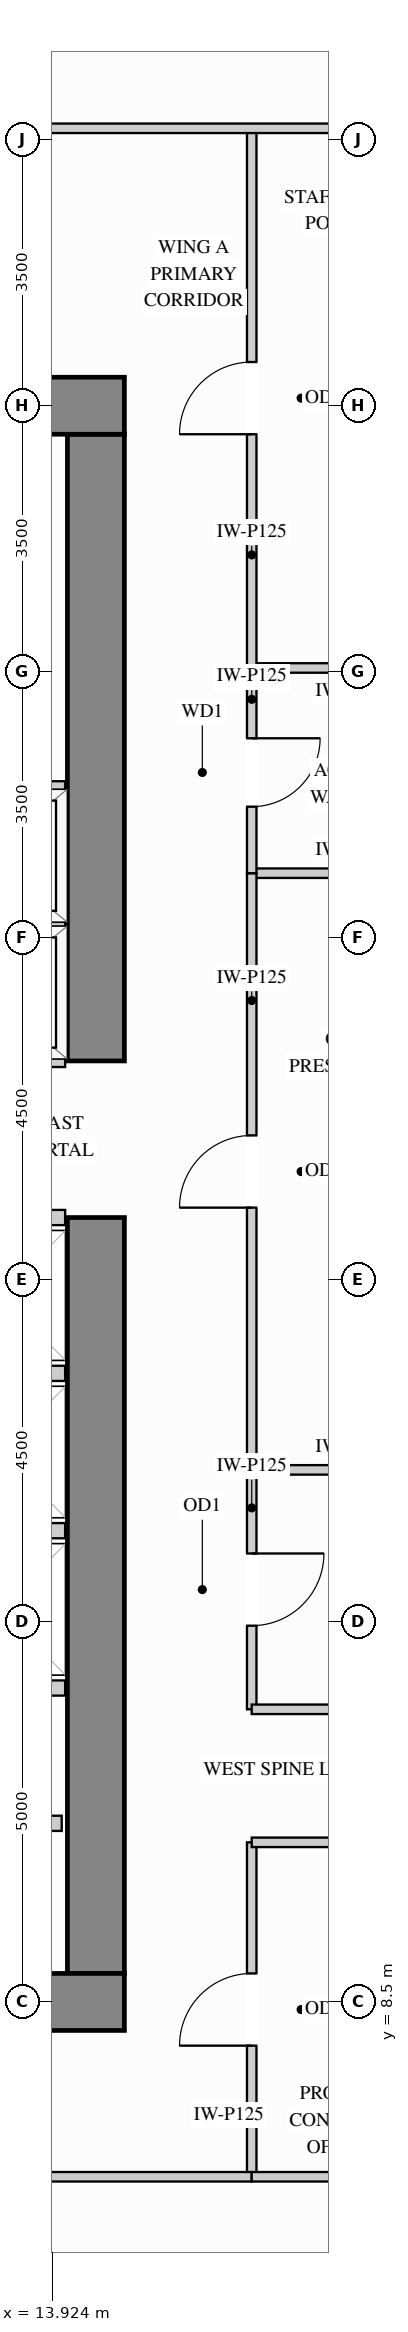
"""IFC4 building model, lengths in metres.
Left out: names, types, materials, properties, quantities, classifications, styles, units other than length and angle.
Written with IfcOpenShell. Run it as: python <this file> out.ifc"""

import sys

from ifc_helpers import new_model, si_unit, direction, frame, frame_2d, origin, place, context, subcontext, project, spatial, rectangle, extrude, source, transform, mapped, element, fill, save


model = new_model("IFC4")
c1 = context("Model", 3, precision=1e-05, world=origin(), true_north=direction((0.0, 1.0)))
c2 = subcontext(c1, "Body", "Model", "MODEL_VIEW")
j1 = project(units=[si_unit("LENGTHUNIT", "METRE"), si_unit("PLANEANGLEUNIT", "RADIAN")], contexts=[c1])
p1 = place(None, origin())
s1 = spatial("IfcSite", under=j1, at=p1, CompositionType="ELEMENT")
p2 = place(p1, origin())
s2 = spatial("IfcBuilding", under=s1, at=p2, CompositionType="ELEMENT")
p3 = place(p2, frame((0.0, 0.0, 84.6)))
s3 = spatial("IfcBuildingStorey", under=s2, at=p3, CompositionType="ELEMENT", Elevation=84.6)
m1 = source(origin(), c2, "Body", "SweptSolid", [
    extrude(rectangle(XDim=9.945, YDim=0.75, at=frame_2d((4.973, 0.0))), origin(), (0.0, 0.0, 1.0), 3.38),
])
p4 = place(p3, frame((14.5, 8.875, 0.0), z_axis=(0.0, 0.0, 1.0), x_axis=(0.0, 1.0, 0.0)))
e1 = element("IfcWall", 1, at=p4, inside=s3, PredefinedType="SHEAR", context=c2, shape_type="MappedRepresentation", body=[
    mapped(m1, transform((0.0, 0.0, 0.0), x_axis=(1.0, 0.0, 0.0), y_axis=(0.0, 1.0, 0.0), z_axis=(0.0, 0.0, 1.0))),
])
m2 = source(origin(), c2, "Body", "SweptSolid", [
    extrude(rectangle(XDim=8.245, YDim=0.75, at=frame_2d((4.123, 0.0))), origin(), (0.0, 0.0, 1.0), 3.38),
])
p5 = place(p3, frame((14.5, 20.88, 0.0), z_axis=(0.0, 0.0, 1.0), x_axis=(0.0, 1.0, 0.0)))
e2 = element("IfcWall", 2, at=p5, inside=s3, PredefinedType="SHEAR", context=c2, shape_type="MappedRepresentation", body=[
    mapped(m2, transform((0.0, 0.0, 0.0), x_axis=(1.0, 0.0, 0.0), y_axis=(0.0, 1.0, 0.0), z_axis=(0.0, 0.0, 1.0))),
])
m3 = source(origin(), c2, "Body", "SweptSolid", [
    extrude(rectangle(XDim=10.75, YDim=0.75, at=frame_2d((5.375, 0.0))), origin(), (0.0, 0.0, 1.0), 3.38),
])
for number, where, z_axis, x_axis in (
    (3, (4.125, 29.5, 0.0), (0.0, 0.0, 1.0), (1.0, 0.0, 0.0)),
    (4, (4.125, 8.5, 0.0), (0.0, 0.0, 1.0), (1.0, 0.0, 0.0)),
):
    element("IfcWall", number, at=place(p3, frame(where, z_axis=z_axis, x_axis=x_axis)), inside=s3, PredefinedType="SHEAR", context=c2, shape_type="MappedRepresentation", body=[
        mapped(m3, transform((0.0, 0.0, 0.0), x_axis=(1.0, 0.0, 0.0), y_axis=(0.0, 1.0, 0.0), z_axis=(0.0, 0.0, 1.0))),
    ])
m4 = source(origin(), c2, "Body", "SweptSolid", [
    extrude(rectangle(XDim=2.6, YDim=0.125, at=frame_2d((1.3, 0.0))), origin(), (0.0, 0.0, 1.0), 3.365),
])
p6 = place(p3, frame((16.55, 15.5, 0.0), z_axis=(0.0, 0.0, 1.0), x_axis=(1.0, 0.0, 0.0)))
e5 = element("IfcWall", 5, at=p6, inside=s3, PredefinedType="PARTITIONING", context=c2, shape_type="MappedRepresentation", body=[
    mapped(m4, transform((0.0, 0.0, 0.0), x_axis=(1.0, 0.0, 0.0), y_axis=(0.0, 1.0, 0.0), z_axis=(0.0, 0.0, 1.0))),
])
m5 = source(origin(), c2, "Body", "SweptSolid", [
    extrude(rectangle(XDim=2.598, YDim=0.125, at=frame_2d((1.299, 0.0))), origin(), (0.0, 0.0, 1.0), 3.365),
])
for number, where, z_axis, x_axis in (
    (6, (16.55, 23.35, 0.0), (0.0, 0.0, 1.0), (1.0, 0.0, 0.0)),
    (7, (16.55, 26.05, 0.0), (0.0, 0.0, 1.0), (1.0, 0.0, 0.0)),
):
    element("IfcWall", number, at=place(p3, frame(where, z_axis=z_axis, x_axis=x_axis)), inside=s3, PredefinedType="PARTITIONING", context=c2, shape_type="MappedRepresentation", body=[
        mapped(m5, transform((0.0, 0.0, 0.0), x_axis=(1.0, 0.0, 0.0), y_axis=(0.0, 1.0, 0.0), z_axis=(0.0, 0.0, 1.0))),
    ])
p7 = place(p3, frame((16.55, 12.35, 0.0), z_axis=(0.0, 0.0, 1.0), x_axis=(0.0, 1.0, 0.0)))
e8 = element("IfcWall", 8, at=p7, inside=s3, PredefinedType="PARTITIONING", context=c2, shape_type="SweptSolid", body=[
    extrude(rectangle(XDim=3.15, YDim=0.125, at=frame_2d((1.575, 0.0))), origin(), (0.0, 0.0, 1.0), 3.365),
])
p8 = place(p7, frame((1.1, 0.0, 0.0)))
e9 = element("IfcOpeningElement", 9, at=p8, cuts=e8, PredefinedType="OPENING", context=c2, shape_type="SweptSolid", body=[
    extrude(rectangle(XDim=0.95, YDim=2.15, at=frame_2d((0.475, 1.075))), frame((0.0, 0.073, 0.0), z_axis=(0.0, -1.0, 0.0), x_axis=(1.0, 0.0, 0.0)), (0.0, 0.0, 1.0), 0.145),
])
p9 = place(p3, frame((16.55, 15.5, 0.0), z_axis=(0.0, 0.0, 1.0), x_axis=(0.0, 1.0, 0.0)))
e10 = element("IfcWall", 10, at=p9, inside=s3, PredefinedType="PARTITIONING", context=c2, shape_type="SweptSolid", body=[
    extrude(rectangle(XDim=7.85, YDim=0.125, at=frame_2d((3.925, 0.0))), origin(), (0.0, 0.0, 1.0), 3.365),
])
p10 = place(p9, frame((3.45, 0.0, 0.0)))
e11 = element("IfcOpeningElement", 11, at=p10, cuts=e10, PredefinedType="OPENING", context=c2, shape_type="SweptSolid", body=[
    extrude(rectangle(XDim=0.95, YDim=2.15, at=frame_2d((0.475, 1.075))), frame((0.0, 0.073, 0.0), z_axis=(0.0, -1.0, 0.0), x_axis=(1.0, 0.0, 0.0)), (0.0, 0.0, 1.0), 0.145),
])
p11 = place(p3, frame((16.55, 26.05, 0.0), z_axis=(0.0, 0.0, 1.0), x_axis=(0.0, 1.0, 0.0)))
e12 = element("IfcWall", 12, at=p11, inside=s3, PredefinedType="PARTITIONING", context=c2, shape_type="SweptSolid", body=[
    extrude(rectangle(XDim=7.1, YDim=0.125, at=frame_2d((3.55, 0.0))), origin(), (0.0, 0.0, 1.0), 3.365),
])
p12 = place(p11, frame((3.075, 0.0, 0.0)))
e13 = element("IfcOpeningElement", 13, at=p12, cuts=e12, PredefinedType="OPENING", context=c2, shape_type="SweptSolid", body=[
    extrude(rectangle(XDim=0.95, YDim=2.15, at=frame_2d((0.475, 1.075))), frame((0.0, 0.073, 0.0), z_axis=(0.0, -1.0, 0.0), x_axis=(1.0, 0.0, 0.0)), (0.0, 0.0, 1.0), 0.145),
])
p13 = place(p3, frame((16.55, 6.2, 0.0), z_axis=(0.0, 0.0, 1.0), x_axis=(0.0, 1.0, 0.0)))
e14 = element("IfcWall", 14, at=p13, inside=s3, PredefinedType="PARTITIONING", context=c2, shape_type="SweptSolid", body=[
    extrude(rectangle(XDim=4.4, YDim=0.125, at=frame_2d((2.2, 0.0))), origin(), (0.0, 0.0, 1.0), 3.365),
])
p14 = place(p13, frame((1.725, 0.0, 0.0)))
e15 = element("IfcOpeningElement", 15, at=p14, cuts=e14, PredefinedType="OPENING", context=c2, shape_type="SweptSolid", body=[
    extrude(rectangle(XDim=0.95, YDim=2.15, at=frame_2d((0.475, 1.075))), frame((0.0, 0.073, 0.0), z_axis=(0.0, -1.0, 0.0), x_axis=(1.0, 0.0, 0.0)), (0.0, 0.0, 1.0), 0.145),
])
p15 = place(p3, frame((16.55, 23.35, 0.0), z_axis=(0.0, 0.0, 1.0), x_axis=(0.0, 1.0, 0.0)))
e16 = element("IfcWall", 16, at=p15, inside=s3, PredefinedType="PARTITIONING", context=c2, shape_type="SweptSolid", body=[
    extrude(rectangle(XDim=2.7, YDim=0.125, at=frame_2d((1.35, 0.0))), origin(), (0.0, 0.0, 1.0), 3.365),
])
p16 = place(p15, frame((0.875, 0.0, 0.0)))
e17 = element("IfcOpeningElement", 17, at=p16, cuts=e16, PredefinedType="OPENING", context=c2, shape_type="SweptSolid", body=[
    extrude(rectangle(XDim=0.9, YDim=2.15, at=frame_2d((0.45, 1.075))), frame((0.0, 0.073, 0.0), z_axis=(0.0, -1.0, 0.0), x_axis=(1.0, 0.0, 0.0)), (0.0, 0.0, 1.0), 0.145),
])
m6 = source(origin(), c2, "Body", "SweptSolid", [
    extrude(rectangle(XDim=12.598, YDim=0.125, at=frame_2d((6.299, 0.0))), origin(), (0.0, 0.0, 1.0), 3.365),
])
p17 = place(p3, frame((6.55, 33.15, 0.0), z_axis=(0.0, 0.0, 1.0), x_axis=(1.0, 0.0, 0.0)))
e18 = element("IfcWall", 18, at=p17, inside=s3, PredefinedType="PARTITIONING", context=c2, shape_type="MappedRepresentation", body=[
    mapped(m6, transform((0.0, 0.0, 0.0), x_axis=(1.0, 0.0, 0.0), y_axis=(0.0, 1.0, 0.0), z_axis=(0.0, 0.0, 1.0))),
])
m7 = source(origin(), c2, "Body", "SweptSolid", [
    extrude(rectangle(XDim=2.95, YDim=0.125, at=frame_2d((1.475, 0.0))), origin(), (0.0, 0.0, 1.0), 3.365),
])
for number, where, z_axis, x_axis in (
    (19, (16.55, 12.35, 0.0), (0.0, 0.0, 1.0), (1.0, 0.0, 0.0)),
    (20, (16.55, 10.6, 0.0), (0.0, 0.0, 1.0), (1.0, 0.0, 0.0)),
):
    element("IfcWall", number, at=place(p3, frame(where, z_axis=z_axis, x_axis=x_axis)), inside=s3, PredefinedType="PARTITIONING", context=c2, shape_type="MappedRepresentation", body=[
        mapped(m7, transform((0.0, 0.0, 0.0), x_axis=(1.0, 0.0, 0.0), y_axis=(0.0, 1.0, 0.0), z_axis=(0.0, 0.0, 1.0))),
    ])
p18 = place(p3, frame((2.45, 6.2, 0.0), z_axis=(0.0, 0.0, 1.0), x_axis=(1.0, 0.0, 0.0)))
e21 = element("IfcWall", 21, at=p18, inside=s3, PredefinedType="PARTITIONING", context=c2, shape_type="SweptSolid", body=[
    extrude(rectangle(XDim=14.1, YDim=0.125, at=frame_2d((7.05, 0.0))), origin(), (0.0, 0.0, 1.0), 2.828),
])
p19 = place(p18, frame((6.575, 0.0, 0.0)))
e22 = element("IfcOpeningElement", 22, at=p19, cuts=e21, PredefinedType="OPENING", context=c2, shape_type="SweptSolid", body=[
    extrude(rectangle(XDim=0.95, YDim=2.15, at=frame_2d((0.475, 1.075))), frame((0.0, 0.073, 0.0), z_axis=(0.0, -1.0, 0.0), x_axis=(1.0, 0.0, 0.0)), (0.0, 0.0, 1.0), 0.145),
])
m8 = source(origin(), c2, "Body", "SweptSolid", [
    extrude(rectangle(XDim=2.6, YDim=0.125, at=frame_2d((1.3, 0.0))), origin(), (0.0, 0.0, 1.0), 2.828),
])
p20 = place(p3, frame((16.55, 6.2, 0.0), z_axis=(0.0, 0.0, 1.0), x_axis=(1.0, 0.0, 0.0)))
e23 = element("IfcWall", 23, at=p20, inside=s3, PredefinedType="PARTITIONING", context=c2, shape_type="MappedRepresentation", body=[
    mapped(m8, transform((0.0, 0.0, 0.0), x_axis=(1.0, 0.0, 0.0), y_axis=(0.0, 1.0, 0.0), z_axis=(0.0, 0.0, 1.0))),
])
m9 = source(origin(), c2, "Body", "SweptSolid", [
    extrude(rectangle(XDim=1.63, YDim=0.2, at=frame_2d((0.815, 0.0))), origin(), (0.0, 0.0, 1.0), 3.365),
])
p21 = place(p3, frame((12.42, 10.85, 0.0), z_axis=(0.0, 0.0, 1.0), x_axis=(1.0, 0.0, 0.0)))
e24 = element("IfcWall", 24, at=p21, inside=s3, PredefinedType="PARTITIONING", context=c2, shape_type="MappedRepresentation", body=[
    mapped(m9, transform((0.0, 0.0, 0.0), x_axis=(1.0, 0.0, 0.0), y_axis=(0.0, 1.0, 0.0), z_axis=(0.0, 0.0, 1.0))),
])
m10 = source(origin(), c2, "Body", "SweptSolid", [
    extrude(rectangle(XDim=2.265, YDim=0.2, at=frame_2d((1.132, 0.0))), origin(), (0.0, 0.0, 1.0), 3.365),
])
for number, where, z_axis, x_axis in (
    (25, (11.83, 22.66, 0.0), (0.0, 0.0, 1.0), (1.0, 0.0, 0.0)),
    (26, (11.83, 20.9, 0.0), (0.0, 0.0, 1.0), (1.0, 0.0, 0.0)),
    (27, (11.83, 24.46, 0.0), (0.0, 0.0, 1.0), (1.0, 0.0, 0.0)),
):
    element("IfcWall", number, at=place(p3, frame(where, z_axis=z_axis, x_axis=x_axis)), inside=s3, PredefinedType="PARTITIONING", context=c2, shape_type="MappedRepresentation", body=[
        mapped(m10, transform((0.0, 0.0, 0.0), x_axis=(1.0, 0.0, 0.0), y_axis=(0.0, 1.0, 0.0), z_axis=(0.0, 0.0, 1.0))),
    ])
m11 = source(origin(), c2, "Body", "SweptSolid", [
    extrude(rectangle(XDim=1.865, YDim=0.2, at=frame_2d((0.933, 0.0))), origin(), (0.0, 0.0, 1.0), 3.365),
])
for number, where, z_axis, x_axis in (
    (28, (12.23, 14.7, 0.0), (0.0, 0.0, 1.0), (1.0, 0.0, 0.0)),
    (29, (12.23, 12.63, 0.0), (0.0, 0.0, 1.0), (1.0, 0.0, 0.0)),
    (30, (12.23, 16.77, 0.0), (0.0, 0.0, 1.0), (1.0, 0.0, 0.0)),
    (31, (12.23, 18.82, 0.0), (0.0, 0.0, 1.0), (1.0, 0.0, 0.0)),
):
    element("IfcWall", number, at=place(p3, frame(where, z_axis=z_axis, x_axis=x_axis)), inside=s3, PredefinedType="PARTITIONING", context=c2, shape_type="MappedRepresentation", body=[
        mapped(m11, transform((0.0, 0.0, 0.0), x_axis=(1.0, 0.0, 0.0), y_axis=(0.0, 1.0, 0.0), z_axis=(0.0, 0.0, 1.0))),
    ])
m12 = source(origin(), c2, "Body", "SweptSolid", [
    extrude(rectangle(XDim=0.95, YDim=2.15, at=frame_2d((0.475, 1.075))), frame((0.0, 0.025, 0.0), z_axis=(0.0, -1.0, 0.0), x_axis=(1.0, 0.0, 0.0)), (0.0, 0.0, 1.0), 0.05),
])
p22 = place(p14, origin())
e32 = element("IfcDoor", 32, at=p22, inside=s3, OperationType="SINGLE_SWING_LEFT", PredefinedType="DOOR", context=c2, shape_type="MappedRepresentation", body=[
    mapped(m12, transform((0.0, 0.0, 0.0), x_axis=(1.0, 0.0, 0.0), y_axis=(0.0, 1.0, 0.0), z_axis=(0.0, 0.0, 1.0))),
])
fill(e15, e32)
p23 = place(p8, origin())
e33 = element("IfcDoor", 33, at=p23, inside=s3, OperationType="SINGLE_SWING_RIGHT", PredefinedType="DOOR", context=c2, shape_type="MappedRepresentation", body=[
    mapped(m12, transform((0.0, 0.0, 0.0), x_axis=(1.0, 0.0, 0.0), y_axis=(0.0, 1.0, 0.0), z_axis=(0.0, 0.0, 1.0))),
])
fill(e9, e33)
p24 = place(p10, origin())
e34 = element("IfcDoor", 34, at=p24, inside=s3, OperationType="SINGLE_SWING_LEFT", PredefinedType="DOOR", context=c2, shape_type="MappedRepresentation", body=[
    mapped(m12, transform((0.0, 0.0, 0.0), x_axis=(1.0, 0.0, 0.0), y_axis=(0.0, 1.0, 0.0), z_axis=(0.0, 0.0, 1.0))),
])
fill(e11, e34)
p25 = place(p12, origin())
e35 = element("IfcDoor", 35, at=p25, inside=s3, OperationType="SINGLE_SWING_LEFT", PredefinedType="DOOR", context=c2, shape_type="MappedRepresentation", body=[
    mapped(m12, transform((0.0, 0.0, 0.0), x_axis=(1.0, 0.0, 0.0), y_axis=(0.0, 1.0, 0.0), z_axis=(0.0, 0.0, 1.0))),
])
fill(e13, e35)
m13 = source(origin(), c2, "Body", "SweptSolid", [
    extrude(rectangle(XDim=0.9, YDim=2.15, at=frame_2d((0.45, 1.075))), frame((0.0, 0.025, 0.0), z_axis=(0.0, -1.0, 0.0), x_axis=(1.0, 0.0, 0.0)), (0.0, 0.0, 1.0), 0.05),
])
p26 = place(p16, origin())
e36 = element("IfcDoor", 36, at=p26, inside=s3, OperationType="SINGLE_SWING_RIGHT", PredefinedType="DOOR", context=c2, shape_type="MappedRepresentation", body=[
    mapped(m13, transform((0.0, 0.0, 0.0), x_axis=(1.0, 0.0, 0.0), y_axis=(0.0, 1.0, 0.0), z_axis=(0.0, 0.0, 1.0))),
])
fill(e17, e36)
save(model, sys.argv[1])
